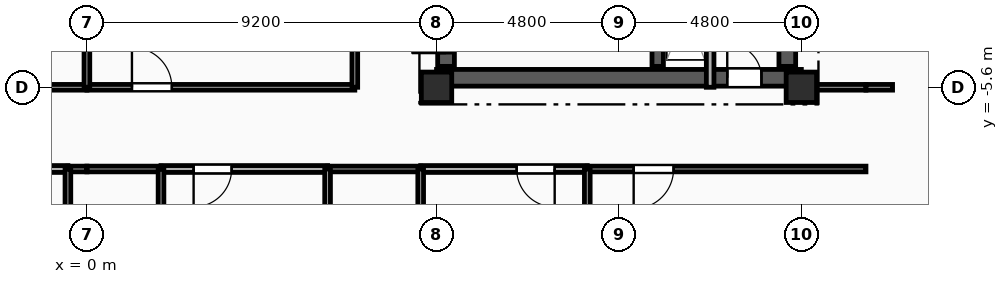
"""IFC4 building model, lengths in metres.
Left out: names, types, materials, properties, quantities, classifications, styles, units other than length and angle.
Written with IfcOpenShell. Run it as: python <this file> out.ifc"""

import sys

from ifc_helpers import new_model, si_unit, direction, frame, frame_2d, origin, origin_2d, place, context, subcontext, project, spatial, rectangle, extrude, element, fill, save


model = new_model("IFC4")
c1 = context("Model", 3, precision=1e-05, world=origin(), true_north=direction((0.0, 1.0)))
c2 = subcontext(c1, "Body", "Model", "MODEL_VIEW")
j1 = project(units=[si_unit("LENGTHUNIT", "METRE"), si_unit("PLANEANGLEUNIT", "RADIAN")], contexts=[c1])
p1 = place(None, origin())
s1 = spatial("IfcSite", under=j1, at=p1, CompositionType="ELEMENT")
p2 = place(p1, origin())
s2 = spatial("IfcBuilding", under=s1, at=p2, CompositionType="ELEMENT")
p3 = place(p2, frame((0.0, 0.0, 248.4)))
s3 = spatial("IfcBuildingStorey", under=s2, at=p3, CompositionType="ELEMENT", Elevation=248.4)
for number, where, z_axis, x_axis in (
    (1, (9.2, -5.6, 0.0), (0.0, 0.0, 1.0), (1.0, 0.0, 0.0)),
    (2, (18.8, -5.6, 0.0), (0.0, 0.0, 1.0), (1.0, 0.0, 0.0)),
):
    element("IfcColumn", number, at=place(p3, frame(where, z_axis=z_axis, x_axis=x_axis)), inside=s3, PredefinedType="COLUMN", context=c2, shape_type="SweptSolid", body=[
        extrude(rectangle(XDim=0.8, YDim=0.8, at=origin_2d()), origin(), (0.0, 0.0, 1.0), 3.35),
    ])
p4 = place(p3, frame((9.2, -5.35, 0.0), z_axis=(0.0, 0.0, 1.0), x_axis=(1.0, 0.0, 0.0)))
e3 = element("IfcWall", 3, at=p4, inside=s3, PredefinedType="SHEAR", context=c2, shape_type="SweptSolid", body=[
    extrude(rectangle(XDim=9.6, YDim=0.44, at=frame_2d((4.8, 0.0))), origin(), (0.0, 0.0, 1.0), 3.04),
])
p5 = place(p4, frame((7.65, 0.0, 0.0)))
e4 = element("IfcOpeningElement", 4, at=p5, cuts=e3, PredefinedType="OPENING", context=c2, shape_type="SweptSolid", body=[
    extrude(rectangle(XDim=0.9, YDim=2.1, at=frame_2d((0.45, 1.05))), frame((0.0, 0.23, 0.0), z_axis=(0.0, -1.0, 0.0), x_axis=(1.0, 0.0, 0.0)), (0.0, 0.0, 1.0), 0.46),
])
p6 = place(p3, frame((9.45, -5.05, 0.0), z_axis=(0.0, 0.0, 1.0), x_axis=(0.0, 1.0, 0.0)))
e5 = element("IfcWall", 5, at=p6, inside=s3, PredefinedType="SHEAR", context=c2, shape_type="SweptSolid", body=[
    extrude(rectangle(XDim=10.1, YDim=0.44, at=frame_2d((5.05, 0.0))), origin(), (0.0, 0.0, 1.0), 3.04),
])
p7 = place(p6, frame((7.15, 0.0, 0.0)))
e6 = element("IfcOpeningElement", 6, at=p7, cuts=e5, PredefinedType="OPENING", context=c2, shape_type="SweptSolid", body=[
    extrude(rectangle(XDim=0.9, YDim=2.1, at=frame_2d((0.45, 1.05))), frame((0.0, 0.23, 0.0), z_axis=(0.0, -1.0, 0.0), x_axis=(1.0, 0.0, 0.0)), (0.0, 0.0, 1.0), 0.46),
])
p8 = place(p6, frame((2.4, 0.0, 0.0)))
e7 = element("IfcOpeningElement", 7, at=p8, cuts=e5, PredefinedType="OPENING", context=c2, shape_type="SweptSolid", body=[
    extrude(rectangle(XDim=1.2, YDim=2.15, at=frame_2d((0.6, 1.075))), frame((0.0, 0.23, 0.0), z_axis=(0.0, -1.0, 0.0), x_axis=(1.0, 0.0, 0.0)), (0.0, 0.0, 1.0), 0.46),
])
p9 = place(p6, frame((0.35, 0.0, 0.0)))
e8 = element("IfcOpeningElement", 8, at=p9, cuts=e5, PredefinedType="OPENING", context=c2, shape_type="SweptSolid", body=[
    extrude(rectangle(XDim=0.9, YDim=2.1, at=frame_2d((0.45, 1.05))), frame((0.0, 0.23, 0.0), z_axis=(0.0, -1.0, 0.0), x_axis=(1.0, 0.0, 0.0)), (0.0, 0.0, 1.0), 0.46),
])
p10 = place(p3, frame((18.43, -5.05, 0.0), z_axis=(0.0, 0.0, 1.0), x_axis=(0.0, 1.0, 0.0)))
e9 = element("IfcWall", 9, at=p10, inside=s3, PredefinedType="SHEAR", context=c2, shape_type="SweptSolid", body=[
    extrude(rectangle(XDim=10.1, YDim=0.44, at=frame_2d((5.05, 0.0))), origin(), (0.0, 0.0, 1.0), 3.04),
])
p11 = place(p3, frame((15.02, -5.05, 0.0), z_axis=(0.0, 0.0, 1.0), x_axis=(0.0, 1.0, 0.0)))
e10 = element("IfcWall", 10, at=p11, inside=s3, PredefinedType="SHEAR", context=c2, shape_type="SweptSolid", body=[
    extrude(rectangle(XDim=10.1, YDim=0.3, at=frame_2d((5.05, 0.0))), origin(), (0.0, 0.0, 1.0), 3.04),
])
p12 = place(p3, frame((16.4, -2.11, 0.0), z_axis=(0.0, 0.0, 1.0), x_axis=(0.0, -1.0, 0.0)))
e11 = element("IfcWall", 11, at=p12, inside=s3, PredefinedType="PARTITIONING", context=c2, shape_type="SweptSolid", body=[
    extrude(rectangle(XDim=3.49, YDim=0.2, at=frame_2d((1.745, 0.0))), origin(), (0.0, 0.0, 1.0), 3.04),
])
p13 = place(p3, frame((-0.5, -7.75, 0.0), z_axis=(0.0, 0.0, 1.0), x_axis=(-1.0, 0.0, 0.0)))
e12 = element("IfcWall", 12, at=p13, inside=s3, PredefinedType="PARTITIONING", context=c2, shape_type="SweptSolid", body=[
    extrude(rectangle(XDim=4.383, YDim=0.18, at=frame_2d((2.191, 0.0))), origin(), (0.0, 0.0, 1.0), 3.04),
])
p14 = place(p13, frame((0.858, 0.0, 0.0)))
e13 = element("IfcOpeningElement", 13, at=p14, cuts=e12, PredefinedType="OPENING", context=c2, shape_type="SweptSolid", body=[
    extrude(rectangle(XDim=1.0, YDim=2.15, at=frame_2d((0.5, 1.075))), frame((0.0, 0.1, 0.0), z_axis=(0.0, -1.0, 0.0), x_axis=(1.0, 0.0, 0.0)), (0.0, 0.0, 1.0), 0.2),
])
p15 = place(p3, frame((0.0, -7.75, 0.0), z_axis=(0.0, 0.0, 1.0), x_axis=(-1.0, 0.0, 0.0)))
e14 = element("IfcWall", 14, at=p15, inside=s3, PredefinedType="PLUMBINGWALL", context=c2, shape_type="SweptSolid", body=[
    extrude(rectangle(XDim=0.5, YDim=0.15, at=frame_2d((0.25, 0.0))), origin(), (0.0, 0.0, 1.0), 3.04),
])
p16 = place(p3, frame((-7.05, -5.6, 0.0), z_axis=(0.0, 0.0, 1.0), x_axis=(1.0, 0.0, 0.0)))
e15 = element("IfcWall", 15, at=p16, inside=s3, PredefinedType="PARTITIONING", context=c2, shape_type="SweptSolid", body=[
    extrude(rectangle(XDim=7.05, YDim=0.15, at=frame_2d((3.525, 0.0))), origin(), (0.0, 0.0, 1.0), 2.525),
])
p17 = place(p3, frame((18.8, -5.6, 0.0), z_axis=(0.0, 0.0, 1.0), x_axis=(1.0, 0.0, 0.0)))
e16 = element("IfcWall", 16, at=p17, inside=s3, PredefinedType="PARTITIONING", context=c2, shape_type="SweptSolid", body=[
    extrude(rectangle(XDim=1.7, YDim=0.15, at=frame_2d((0.85, 0.0))), origin(), (0.0, 0.0, 1.0), 3.04),
])
p18 = place(p3, frame((20.5, -5.6, 0.0), z_axis=(0.0, 0.0, 1.0), x_axis=(1.0, 0.0, 0.0)))
e17 = element("IfcWall", 17, at=p18, inside=s3, PredefinedType="PARTITIONING", context=c2, shape_type="SweptSolid", body=[
    extrude(rectangle(XDim=0.7, YDim=0.15, at=frame_2d((0.35, 0.0))), origin(), (0.0, 0.0, 1.0), 3.04),
])
p19 = place(p3, frame((6.333, -7.75, 0.0), z_axis=(0.0, 0.0, 1.0), x_axis=(-1.0, 0.0, 0.0)))
e18 = element("IfcWall", 18, at=p19, inside=s3, PredefinedType="PARTITIONING", context=c2, shape_type="SweptSolid", body=[
    extrude(rectangle(XDim=4.383, YDim=0.18, at=frame_2d((2.191, 0.0))), origin(), (0.0, 0.0, 1.0), 3.04),
])
p20 = place(p19, frame((2.525, 0.0, 0.0)))
e19 = element("IfcOpeningElement", 19, at=p20, cuts=e18, PredefinedType="OPENING", context=c2, shape_type="SweptSolid", body=[
    extrude(rectangle(XDim=1.0, YDim=2.15, at=frame_2d((0.5, 1.075))), frame((0.0, 0.1, 0.0), z_axis=(0.0, -1.0, 0.0), x_axis=(1.0, 0.0, 0.0)), (0.0, 0.0, 1.0), 0.2),
])
p21 = place(p3, frame((1.95, -7.75, 0.0), z_axis=(0.0, 0.0, 1.0), x_axis=(-1.0, 0.0, 0.0)))
e20 = element("IfcWall", 20, at=p21, inside=s3, PredefinedType="PLUMBINGWALL", context=c2, shape_type="SweptSolid", body=[
    extrude(rectangle(XDim=1.95, YDim=0.15, at=frame_2d((0.975, 0.0))), origin(), (0.0, 0.0, 1.0), 3.04),
])
p22 = place(p3, frame((13.167, -7.75, 0.0), z_axis=(0.0, 0.0, 1.0), x_axis=(-1.0, 0.0, 0.0)))
e21 = element("IfcWall", 21, at=p22, inside=s3, PredefinedType="PARTITIONING", context=c2, shape_type="SweptSolid", body=[
    extrude(rectangle(XDim=4.384, YDim=0.18, at=frame_2d((2.192, 0.0))), origin(), (0.0, 0.0, 1.0), 3.04),
])
p23 = place(p22, frame((0.858, 0.0, 0.0)))
e22 = element("IfcOpeningElement", 22, at=p23, cuts=e21, PredefinedType="OPENING", context=c2, shape_type="SweptSolid", body=[
    extrude(rectangle(XDim=1.0, YDim=2.15, at=frame_2d((0.5, 1.075))), frame((0.0, 0.1, 0.0), z_axis=(0.0, -1.0, 0.0), x_axis=(1.0, 0.0, 0.0)), (0.0, 0.0, 1.0), 0.2),
])
p24 = place(p3, frame((8.783, -7.75, 0.0), z_axis=(0.0, 0.0, 1.0), x_axis=(-1.0, 0.0, 0.0)))
e23 = element("IfcWall", 23, at=p24, inside=s3, PredefinedType="PLUMBINGWALL", context=c2, shape_type="SweptSolid", body=[
    extrude(rectangle(XDim=2.45, YDim=0.15, at=frame_2d((1.225, 0.0))), origin(), (0.0, 0.0, 1.0), 3.04),
])
p25 = place(p3, frame((20.5, -7.75, 0.0), z_axis=(0.0, 0.0, 1.0), x_axis=(-1.0, 0.0, 0.0)))
e24 = element("IfcWall", 24, at=p25, inside=s3, PredefinedType="PARTITIONING", context=c2, shape_type="SweptSolid", body=[
    extrude(rectangle(XDim=7.333, YDim=0.15, at=frame_2d((3.667, 0.0))), origin(), (0.0, 0.0, 1.0), 3.04),
])
p26 = place(p25, frame((5.062, 0.0, 0.0)))
e25 = element("IfcOpeningElement", 25, at=p26, cuts=e24, PredefinedType="OPENING", context=c2, shape_type="SweptSolid", body=[
    extrude(rectangle(XDim=1.05, YDim=2.15, at=frame_2d((0.525, 1.075))), frame((0.0, 0.085, 0.0), z_axis=(0.0, -1.0, 0.0), x_axis=(1.0, 0.0, 0.0)), (0.0, 0.0, 1.0), 0.17),
])
p27 = place(p3, frame((0.0, -5.6, 0.0), z_axis=(0.0, 0.0, 1.0), x_axis=(1.0, 0.0, 0.0)))
e26 = element("IfcWall", 26, at=p27, inside=s3, PredefinedType="PARTITIONING", context=c2, shape_type="SweptSolid", body=[
    extrude(rectangle(XDim=7.05, YDim=0.15, at=frame_2d((3.525, 0.0))), origin(), (0.0, 0.0, 1.0), 2.525),
])
p28 = place(p27, frame((1.185, 0.0, 0.0)))
e27 = element("IfcOpeningElement", 27, at=p28, cuts=e26, PredefinedType="OPENING", context=c2, shape_type="SweptSolid", body=[
    extrude(rectangle(XDim=1.05, YDim=2.15, at=frame_2d((0.525, 1.075))), frame((0.0, 0.085, 0.0), z_axis=(0.0, -1.0, 0.0), x_axis=(1.0, 0.0, 0.0)), (0.0, 0.0, 1.0), 0.17),
])
p29 = place(p3, frame((7.05, -5.6, 0.0), z_axis=(0.0, 0.0, 1.0), x_axis=(0.0, 1.0, 0.0)))
e28 = element("IfcWall", 28, at=p29, inside=s3, PredefinedType="PARTITIONING", context=c2, shape_type="SweptSolid", body=[
    extrude(rectangle(XDim=7.05, YDim=0.15, at=frame_2d((3.525, 0.0))), origin(), (0.0, 0.0, 1.0), 3.04),
])
for number, where, z_axis, x_axis in (
    (29, (-0.5, -7.75, 0.0), (0.0, 0.0, 1.0), (0.0, -1.0, 0.0)),
    (30, (1.95, -9.9, 0.0), (0.0, 0.0, 1.0), (0.0, 1.0, 0.0)),
    (31, (6.333, -7.75, 0.0), (0.0, 0.0, 1.0), (0.0, -1.0, 0.0)),
):
    element("IfcWall", number, at=place(p3, frame(where, z_axis=z_axis, x_axis=x_axis)), inside=s3, PredefinedType="PLUMBINGWALL", context=c2, shape_type="SweptSolid", body=[
        extrude(rectangle(XDim=2.15, YDim=0.15, at=frame_2d((1.075, 0.0))), origin(), (0.0, 0.0, 1.0), 3.04),
    ])
p30 = place(p3, frame((8.783, -9.9, 0.0), z_axis=(0.0, 0.0, 1.0), x_axis=(0.0, 1.0, 0.0)))
e32 = element("IfcWall", 32, at=p30, inside=s3, PredefinedType="PLUMBINGWALL", context=c2, shape_type="SweptSolid", body=[
    extrude(rectangle(XDim=2.15, YDim=0.15, at=frame_2d((1.075, 0.0))), origin(), (0.0, 0.0, 1.0), 2.665),
])
p31 = place(p3, frame((13.167, -7.75, 0.0), z_axis=(0.0, 0.0, 1.0), x_axis=(0.0, -1.0, 0.0)))
e33 = element("IfcWall", 33, at=p31, inside=s3, PredefinedType="PARTITIONING", context=c2, shape_type="SweptSolid", body=[
    extrude(rectangle(XDim=10.65, YDim=0.15, at=frame_2d((5.325, 0.0))), origin(), (0.0, 0.0, 1.0), 3.04),
])
p32 = place(p3, frame((0.0, 1.45, 0.0), z_axis=(0.0, 0.0, 1.0), x_axis=(0.0, -1.0, 0.0)))
e34 = element("IfcWall", 34, at=p32, inside=s3, PredefinedType="PARTITIONING", context=c2, shape_type="SweptSolid", body=[
    extrude(rectangle(XDim=7.05, YDim=0.15, at=frame_2d((3.525, 0.0))), origin(), (0.0, 0.0, 1.0), 3.04),
])
p33 = place(p5, origin())
e35 = element("IfcDoor", 35, at=p33, inside=s3, OperationType="SINGLE_SWING_LEFT", PredefinedType="DOOR", context=c2, shape_type="SweptSolid", body=[
    extrude(rectangle(XDim=0.9, YDim=2.1, at=frame_2d((0.45, 1.05))), frame((0.0, 0.025, 0.0), z_axis=(0.0, -1.0, 0.0), x_axis=(1.0, 0.0, 0.0)), (0.0, 0.0, 1.0), 0.05),
])
fill(e4, e35)
p34 = place(p9, origin())
e36 = element("IfcDoor", 36, at=p34, inside=s3, OperationType="SINGLE_SWING_LEFT", PredefinedType="DOOR", context=c2, shape_type="SweptSolid", body=[
    extrude(rectangle(XDim=0.9, YDim=2.1, at=frame_2d((0.45, 1.05))), frame((0.0, 0.025, 0.0), z_axis=(0.0, -1.0, 0.0), x_axis=(1.0, 0.0, 0.0)), (0.0, 0.0, 1.0), 0.05),
])
fill(e8, e36)
p35 = place(p20, origin())
e37 = element("IfcDoor", 37, at=p35, inside=s3, OperationType="SINGLE_SWING_RIGHT", PredefinedType="DOOR", context=c2, shape_type="SweptSolid", body=[
    extrude(rectangle(XDim=1.0, YDim=2.15, at=frame_2d((0.5, 1.075))), frame((0.0, 0.025, 0.0), z_axis=(0.0, -1.0, 0.0), x_axis=(1.0, 0.0, 0.0)), (0.0, 0.0, 1.0), 0.05),
])
fill(e19, e37)
p36 = place(p23, origin())
e38 = element("IfcDoor", 38, at=p36, inside=s3, OperationType="SINGLE_SWING_LEFT", PredefinedType="DOOR", context=c2, shape_type="SweptSolid", body=[
    extrude(rectangle(XDim=1.0, YDim=2.15, at=frame_2d((0.5, 1.075))), frame((0.0, 0.025, 0.0), z_axis=(0.0, -1.0, 0.0), x_axis=(1.0, 0.0, 0.0)), (0.0, 0.0, 1.0), 0.05),
])
fill(e22, e38)
p37 = place(p26, origin())
e39 = element("IfcDoor", 39, at=p37, inside=s3, OperationType="SINGLE_SWING_RIGHT", PredefinedType="DOOR", context=c2, shape_type="SweptSolid", body=[
    extrude(rectangle(XDim=1.05, YDim=2.15, at=frame_2d((0.525, 1.075))), frame((0.0, 0.025, 0.0), z_axis=(0.0, -1.0, 0.0), x_axis=(1.0, 0.0, 0.0)), (0.0, 0.0, 1.0), 0.05),
])
fill(e25, e39)
p38 = place(p28, origin())
e40 = element("IfcDoor", 40, at=p38, inside=s3, OperationType="SINGLE_SWING_LEFT", PredefinedType="DOOR", context=c2, shape_type="SweptSolid", body=[
    extrude(rectangle(XDim=1.05, YDim=2.15, at=frame_2d((0.525, 1.075))), frame((0.0, 0.025, 0.0), z_axis=(0.0, -1.0, 0.0), x_axis=(1.0, 0.0, 0.0)), (0.0, 0.0, 1.0), 0.05),
])
fill(e27, e40)
save(model, sys.argv[1])
